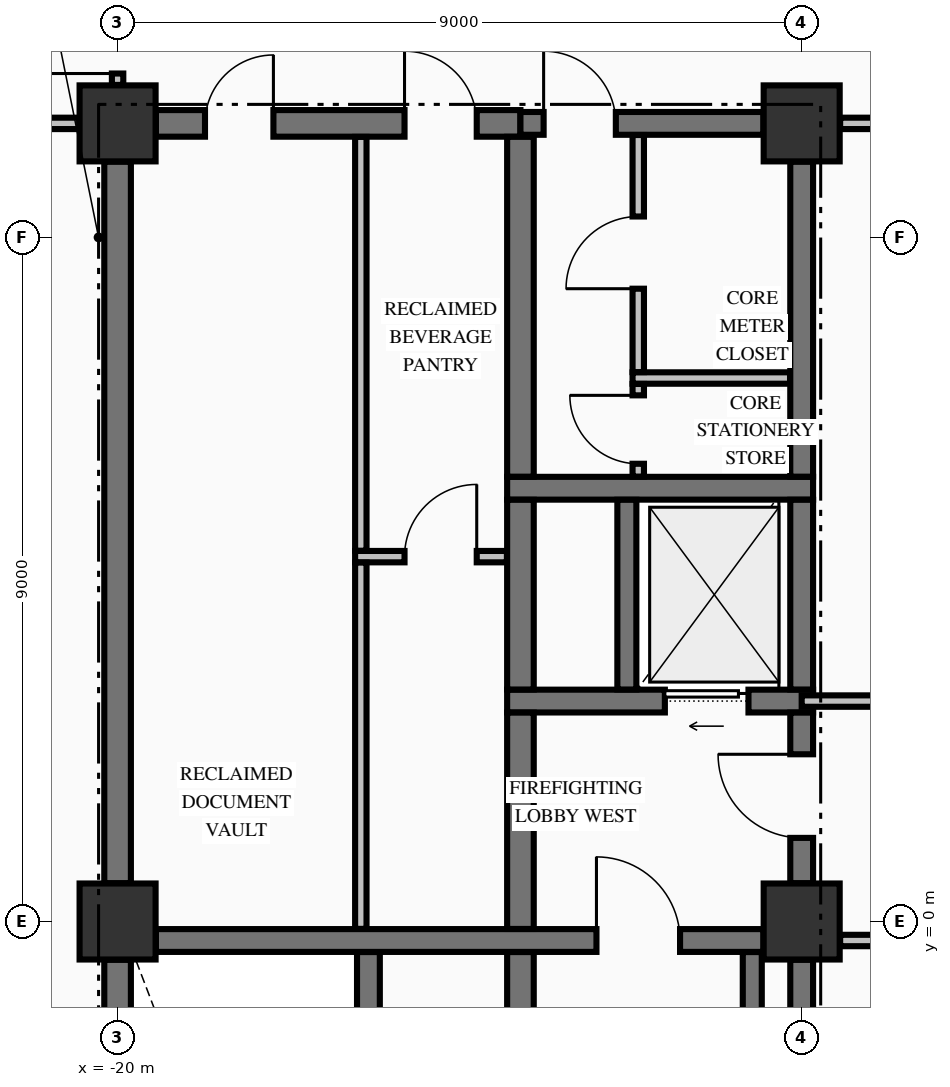
"""IFC4 building model, lengths in metres.
Left out: names, types, materials, properties, quantities, classifications, styles, units other than length and angle.
Written with IfcOpenShell. Run it as: python <this file> out.ifc"""

import sys

from ifc_helpers import new_model, si_unit, direction, frame, frame_2d, origin, origin_2d, place, context, subcontext, project, spatial, rectangle, extrude, element, fill, save


model = new_model("IFC4")
c1 = context("Model", 3, precision=1e-05, world=origin(), true_north=direction((0.0, 1.0)))
c2 = subcontext(c1, "Body", "Model", "MODEL_VIEW")
j1 = project(units=[si_unit("LENGTHUNIT", "METRE"), si_unit("PLANEANGLEUNIT", "RADIAN")], contexts=[c1])
p1 = place(None, origin())
s1 = spatial("IfcSite", under=j1, at=p1, CompositionType="ELEMENT")
p2 = place(p1, origin())
s2 = spatial("IfcBuilding", under=s1, at=p2, CompositionType="ELEMENT")
p3 = place(p2, frame((0.0, 0.0, 146.34)))
s3 = spatial("IfcBuildingStorey", under=s2, at=p3, CompositionType="ELEMENT", Elevation=146.34)
for number, where, z_axis, x_axis in (
    (1, (-20.0, 10.5, -0.25), (0.0, 0.0, 1.0), (1.0, 0.0, 0.0)),
    (2, (-11.0, 0.0, -0.25), (0.0, 0.0, 1.0), (1.0, 0.0, 0.0)),
    (3, (-11.0, 10.5, -0.25), (0.0, 0.0, 1.0), (1.0, 0.0, 0.0)),
    (4, (-20.0, 0.0, -0.25), (0.0, 0.0, 1.0), (1.0, 0.0, 0.0)),
):
    element("IfcColumn", number, at=place(p3, frame(where, z_axis=z_axis, x_axis=x_axis)), inside=s3, PredefinedType="COLUMN", context=c2, shape_type="SweptSolid", body=[
        extrude(rectangle(XDim=1.0, YDim=1.0, at=origin_2d()), origin(), (0.0, 0.0, 1.0), 3.57),
    ])
p4 = place(p3, frame((-19.496, -0.25, 0.0), z_axis=(0.0, 0.0, 1.0), x_axis=(1.0, 0.0, 0.0)))
e5 = element("IfcWall", 5, at=p4, inside=s3, PredefinedType="SHEAR", context=c2, shape_type="SweptSolid", body=[
    extrude(rectangle(XDim=7.992, YDim=0.3, at=frame_2d((3.996, 0.0))), origin(), (0.0, 0.0, 1.0), 3.32),
])
p5 = place(p4, frame((5.796, 0.0, 0.0)))
e6 = element("IfcOpeningElement", 6, at=p5, cuts=e5, PredefinedType="OPENING", context=c2, shape_type="SweptSolid", body=[
    extrude(rectangle(XDim=1.1, YDim=2.15, at=frame_2d((0.55, 1.075))), frame((0.0, 0.16, 0.0), z_axis=(0.0, -1.0, 0.0), x_axis=(1.0, 0.0, 0.0)), (0.0, 0.0, 1.0), 0.32),
])
p6 = place(p3, frame((-14.875, 2.9, 0.0), z_axis=(0.0, 0.0, 1.0), x_axis=(1.0, 0.0, 0.0)))
e7 = element("IfcWall", 7, at=p6, inside=s3, PredefinedType="SHEAR", context=c2, shape_type="SweptSolid", body=[
    extrude(rectangle(XDim=4.025, YDim=0.3, at=frame_2d((2.012, 0.0))), origin(), (0.0, 0.0, 1.0), 3.32),
])
p7 = place(p6, frame((2.075, 0.0, 0.0)))
e8 = element("IfcOpeningElement", 8, at=p7, cuts=e7, PredefinedType="OPENING", context=c2, shape_type="SweptSolid", body=[
    extrude(rectangle(XDim=1.1, YDim=2.2, at=frame_2d((0.55, 1.1))), frame((0.0, 0.16, 0.0), z_axis=(0.0, -1.0, 0.0), x_axis=(1.0, 0.0, 0.0)), (0.0, 0.0, 1.0), 0.32),
])
p8 = place(p3, frame((-14.875, 5.7, 0.0), z_axis=(0.0, 0.0, 1.0), x_axis=(1.0, 0.0, 0.0)))
e9 = element("IfcWall", 9, at=p8, inside=s3, PredefinedType="SHEAR", context=c2, shape_type="SweptSolid", body=[
    extrude(rectangle(XDim=4.025, YDim=0.3, at=frame_2d((2.012, 0.0))), origin(), (0.0, 0.0, 1.0), 3.32),
])
p9 = place(p3, frame((-19.496, 10.5, 0.0), z_axis=(0.0, 0.0, 1.0), x_axis=(1.0, 0.0, 0.0)))
e10 = element("IfcWall", 10, at=p9, inside=s3, PredefinedType="SHEAR", context=c2, shape_type="SweptSolid", body=[
    extrude(rectangle(XDim=4.796, YDim=0.35, at=frame_2d((2.398, 0.0))), origin(), (0.0, 0.0, 1.0), 3.32),
])
p10 = place(p9, frame((0.646, 0.0, 0.0)))
e11 = element("IfcOpeningElement", 11, at=p10, cuts=e10, PredefinedType="OPENING", context=c2, shape_type="SweptSolid", body=[
    extrude(rectangle(XDim=0.9, YDim=2.15, at=frame_2d((0.45, 1.075))), frame((0.0, 0.185, 0.0), z_axis=(0.0, -1.0, 0.0), x_axis=(1.0, 0.0, 0.0)), (0.0, 0.0, 1.0), 0.37),
])
p11 = place(p9, frame((3.271, 0.0, 0.0)))
e12 = element("IfcOpeningElement", 12, at=p11, cuts=e10, PredefinedType="OPENING", context=c2, shape_type="SweptSolid", body=[
    extrude(rectangle(XDim=0.95, YDim=2.15, at=frame_2d((0.475, 1.075))), frame((0.0, 0.185, 0.0), z_axis=(0.0, -1.0, 0.0), x_axis=(1.0, 0.0, 0.0)), (0.0, 0.0, 1.0), 0.37),
])
p12 = place(p3, frame((-14.7, 10.5, 0.0), z_axis=(0.0, 0.0, 1.0), x_axis=(1.0, 0.0, 0.0)))
e13 = element("IfcWall", 13, at=p12, inside=s3, PredefinedType="SHEAR", context=c2, shape_type="SweptSolid", body=[
    extrude(rectangle(XDim=3.196, YDim=0.3, at=frame_2d((1.598, 0.0))), origin(), (0.0, 0.0, 1.0), 3.32),
])
p13 = place(p12, frame((0.305, 0.0, 0.0)))
e14 = element("IfcOpeningElement", 14, at=p13, cuts=e13, PredefinedType="OPENING", context=c2, shape_type="SweptSolid", body=[
    extrude(rectangle(XDim=0.95, YDim=2.15, at=frame_2d((0.475, 1.075))), frame((0.0, 0.16, 0.0), z_axis=(0.0, -1.0, 0.0), x_axis=(1.0, 0.0, 0.0)), (0.0, 0.0, 1.0), 0.32),
])
p14 = place(p3, frame((-10.494, -0.25, 0.0), z_axis=(0.0, 0.0, 1.0), x_axis=(1.0, 0.0, 0.0)))
e15 = element("IfcWall", 15, at=p14, inside=s3, PredefinedType="PARTITIONING", context=c2, shape_type="SweptSolid", body=[
    extrude(rectangle(XDim=20.988, YDim=0.15, at=frame_2d((10.494, 0.0))), origin(), (0.0, 0.0, 1.0), 3.32),
])
p15 = place(p14, frame((12.594, 0.0, 0.0)))
e16 = element("IfcOpeningElement", 16, at=p15, cuts=e15, PredefinedType="OPENING", context=c2, shape_type="SweptSolid", body=[
    extrude(rectangle(XDim=1.1, YDim=2.15, at=frame_2d((0.55, 1.075))), frame((0.0, 0.085, 0.0), z_axis=(0.0, -1.0, 0.0), x_axis=(1.0, 0.0, 0.0)), (0.0, 0.0, 1.0), 0.17),
])
p16 = place(p14, frame((5.249, 0.0, 0.0)))
e17 = element("IfcOpeningElement", 17, at=p16, cuts=e15, PredefinedType="OPENING", context=c2, shape_type="SweptSolid", body=[
    extrude(rectangle(XDim=1.05, YDim=2.15, at=frame_2d((0.525, 1.075))), frame((0.0, 0.085, 0.0), z_axis=(0.0, -1.0, 0.0), x_axis=(1.0, 0.0, 0.0)), (0.0, 0.0, 1.0), 0.17),
])
p17 = place(p14, frame((17.399, 0.0, 0.0)))
e18 = element("IfcOpeningElement", 18, at=p17, cuts=e15, PredefinedType="OPENING", context=c2, shape_type="SweptSolid", body=[
    extrude(rectangle(XDim=0.95, YDim=2.15, at=frame_2d((0.475, 1.075))), frame((0.0, 0.085, 0.0), z_axis=(0.0, -1.0, 0.0), x_axis=(1.0, 0.0, 0.0)), (0.0, 0.0, 1.0), 0.17),
])
p18 = place(p3, frame((-11.0, 2.9, 0.0), z_axis=(0.0, 0.0, 1.0), x_axis=(1.0, 0.0, 0.0)))
e19 = element("IfcWall", 19, at=p18, inside=s3, PredefinedType="PARTITIONING", context=c2, shape_type="SweptSolid", body=[
    extrude(rectangle(XDim=22.0, YDim=0.15, at=frame_2d((11.0, 0.0))), origin(), (0.0, 0.0, 1.0), 3.32),
])
p19 = place(p18, frame((13.1, 0.0, 0.0)))
e20 = element("IfcOpeningElement", 20, at=p19, cuts=e19, PredefinedType="OPENING", context=c2, shape_type="SweptSolid", body=[
    extrude(rectangle(XDim=1.1, YDim=2.15, at=frame_2d((0.55, 1.075))), frame((0.0, 0.085, 0.0), z_axis=(0.0, -1.0, 0.0), x_axis=(1.0, 0.0, 0.0)), (0.0, 0.0, 1.0), 0.17),
])
p20 = place(p18, frame((5.755, 0.0, 0.0)))
e21 = element("IfcOpeningElement", 21, at=p20, cuts=e19, PredefinedType="OPENING", context=c2, shape_type="SweptSolid", body=[
    extrude(rectangle(XDim=1.05, YDim=2.15, at=frame_2d((0.525, 1.075))), frame((0.0, 0.085, 0.0), z_axis=(0.0, -1.0, 0.0), x_axis=(1.0, 0.0, 0.0)), (0.0, 0.0, 1.0), 0.17),
])
p21 = place(p18, frame((15.755, 0.0, 0.0)))
e22 = element("IfcOpeningElement", 22, at=p21, cuts=e19, PredefinedType="OPENING", context=c2, shape_type="SweptSolid", body=[
    extrude(rectangle(XDim=0.95, YDim=2.15, at=frame_2d((0.475, 1.075))), frame((0.0, 0.085, 0.0), z_axis=(0.0, -1.0, 0.0), x_axis=(1.0, 0.0, 0.0)), (0.0, 0.0, 1.0), 0.17),
])
p22 = place(p18, frame((19.385, 0.0, 0.0)))
e23 = element("IfcOpeningElement", 23, at=p22, cuts=e19, PredefinedType="OPENING", context=c2, shape_type="SweptSolid", body=[
    extrude(rectangle(XDim=0.95, YDim=2.15, at=frame_2d((0.475, 1.075))), frame((0.0, 0.085, 0.0), z_axis=(0.0, -1.0, 0.0), x_axis=(1.0, 0.0, 0.0)), (0.0, 0.0, 1.0), 0.17),
])
p23 = place(p3, frame((-16.875, 4.8, 0.0), z_axis=(0.0, 0.0, 1.0), x_axis=(1.0, 0.0, 0.0)))
e24 = element("IfcWall", 24, at=p23, inside=s3, PredefinedType="PARTITIONING", context=c2, shape_type="SweptSolid", body=[
    extrude(rectangle(XDim=1.997, YDim=0.15, at=frame_2d((0.999, 0.0))), origin(), (0.0, 0.0, 1.0), 3.32),
])
p24 = place(p23, frame((0.65, 0.0, 0.0)))
e25 = element("IfcOpeningElement", 25, at=p24, cuts=e24, PredefinedType="OPENING", context=c2, shape_type="SweptSolid", body=[
    extrude(rectangle(XDim=0.95, YDim=2.15, at=frame_2d((0.475, 1.075))), frame((0.0, 0.085, 0.0), z_axis=(0.0, -1.0, 0.0), x_axis=(1.0, 0.0, 0.0)), (0.0, 0.0, 1.0), 0.17),
])
p25 = place(p3, frame((-13.225, 7.15, 0.0), z_axis=(0.0, 0.0, 1.0), x_axis=(1.0, 0.0, 0.0)))
e26 = element("IfcWall", 26, at=p25, inside=s3, PredefinedType="PARTITIONING", context=c2, shape_type="SweptSolid", body=[
    extrude(rectangle(XDim=2.072, YDim=0.15, at=frame_2d((1.036, 0.0))), origin(), (0.0, 0.0, 1.0), 3.32),
])
p26 = place(p3, frame((-27.835, 10.5, 0.0), z_axis=(0.0, 0.0, 1.0), x_axis=(1.0, 0.0, 0.0)))
e27 = element("IfcWall", 27, at=p26, inside=s3, PredefinedType="PARTITIONING", context=c2, shape_type="SweptSolid", body=[
    extrude(rectangle(XDim=7.329, YDim=0.15, at=frame_2d((3.665, 0.0))), origin(), (0.0, 0.0, 1.0), 3.32),
])
p27 = place(p26, frame((3.335, 0.0, 0.0)))
e28 = element("IfcOpeningElement", 28, at=p27, cuts=e27, PredefinedType="OPENING", context=c2, shape_type="SweptSolid", body=[
    extrude(rectangle(XDim=1.0, YDim=2.15, at=frame_2d((0.5, 1.075))), frame((0.0, 0.085, 0.0), z_axis=(0.0, -1.0, 0.0), x_axis=(1.0, 0.0, 0.0)), (0.0, 0.0, 1.0), 0.17),
])
p28 = place(p3, frame((-10.494, 10.5, 0.0), z_axis=(0.0, 0.0, 1.0), x_axis=(1.0, 0.0, 0.0)))
e29 = element("IfcWall", 29, at=p28, inside=s3, PredefinedType="PARTITIONING", context=c2, shape_type="SweptSolid", body=[
    extrude(rectangle(XDim=20.988, YDim=0.15, at=frame_2d((10.494, 0.0))), origin(), (0.0, 0.0, 1.0), 3.32),
])
p29 = place(p28, frame((12.594, 0.0, 0.0)))
e30 = element("IfcOpeningElement", 30, at=p29, cuts=e29, PredefinedType="OPENING", context=c2, shape_type="SweptSolid", body=[
    extrude(rectangle(XDim=1.1, YDim=2.15, at=frame_2d((0.55, 1.075))), frame((0.0, 0.085, 0.0), z_axis=(0.0, -1.0, 0.0), x_axis=(1.0, 0.0, 0.0)), (0.0, 0.0, 1.0), 0.17),
])
p30 = place(p3, frame((-20.0, -9.446, 0.0), z_axis=(0.0, 0.0, 1.0), x_axis=(0.0, 1.0, 0.0)))
e31 = element("IfcWall", 31, at=p30, inside=s3, PredefinedType="SHEAR", context=c2, shape_type="SweptSolid", body=[
    extrude(rectangle(XDim=8.942, YDim=0.35, at=frame_2d((4.471, 0.0))), origin(), (0.0, 0.0, 1.0), 3.32),
])
p31 = place(p3, frame((-20.0, 0.504, 0.0), z_axis=(0.0, 0.0, 1.0), x_axis=(0.0, 1.0, 0.0)))
e32 = element("IfcWall", 32, at=p31, inside=s3, PredefinedType="SHEAR", context=c2, shape_type="SweptSolid", body=[
    extrude(rectangle(XDim=9.492, YDim=0.35, at=frame_2d((4.746, 0.0))), origin(), (0.0, 0.0, 1.0), 3.32),
])
p32 = place(p3, frame((-16.7, -9.773, 0.0), z_axis=(0.0, 0.0, 1.0), x_axis=(0.0, 1.0, 0.0)))
e33 = element("IfcWall", 33, at=p32, inside=s3, PredefinedType="SHEAR", context=c2, shape_type="SweptSolid", body=[
    extrude(rectangle(XDim=9.371, YDim=0.3, at=frame_2d((4.686, 0.0))), origin(), (0.0, 0.0, 1.0), 3.32),
])
p33 = place(p3, frame((-14.7, -9.773, 0.0), z_axis=(0.0, 0.0, 1.0), x_axis=(0.0, 1.0, 0.0)))
e34 = element("IfcWall", 34, at=p33, inside=s3, PredefinedType="SHEAR", context=c2, shape_type="SweptSolid", body=[
    extrude(rectangle(XDim=9.371, YDim=0.35, at=frame_2d((4.686, 0.0))), origin(), (0.0, 0.0, 1.0), 3.32),
])
p34 = place(p3, frame((-14.7, -0.098, 0.0), z_axis=(0.0, 0.0, 1.0), x_axis=(0.0, 1.0, 0.0)))
e35 = element("IfcWall", 35, at=p34, inside=s3, PredefinedType="SHEAR", context=c2, shape_type="SweptSolid", body=[
    extrude(rectangle(XDim=2.846, YDim=0.35, at=frame_2d((1.423, 0.0))), origin(), (0.0, 0.0, 1.0), 3.32),
])
p35 = place(p3, frame((-14.7, 3.052, 0.0), z_axis=(0.0, 0.0, 1.0), x_axis=(0.0, 1.0, 0.0)))
e36 = element("IfcWall", 36, at=p35, inside=s3, PredefinedType="SHEAR", context=c2, shape_type="SweptSolid", body=[
    extrude(rectangle(XDim=2.496, YDim=0.35, at=frame_2d((1.248, 0.0))), origin(), (0.0, 0.0, 1.0), 3.32),
])
p36 = place(p3, frame((-14.7, 5.852, 0.0), z_axis=(0.0, 0.0, 1.0), x_axis=(0.0, 1.0, 0.0)))
e37 = element("IfcWall", 37, at=p36, inside=s3, PredefinedType="SHEAR", context=c2, shape_type="SweptSolid", body=[
    extrude(rectangle(XDim=4.471, YDim=0.35, at=frame_2d((2.235, 0.0))), origin(), (0.0, 0.0, 1.0), 3.32),
])
p37 = place(p3, frame((-13.3, 3.052, 0.0), z_axis=(0.0, 0.0, 1.0), x_axis=(0.0, 1.0, 0.0)))
e38 = element("IfcWall", 38, at=p37, inside=s3, PredefinedType="SOLIDWALL", context=c2, shape_type="SweptSolid", body=[
    extrude(rectangle(XDim=2.496, YDim=0.25, at=frame_2d((1.248, 0.0))), origin(), (0.0, 0.0, 1.0), 3.32),
])
p38 = place(p3, frame((-11.65, -9.798, 0.0), z_axis=(0.0, 0.0, 1.0), x_axis=(0.0, 1.0, 0.0)))
e39 = element("IfcWall", 39, at=p38, inside=s3, PredefinedType="SOLIDWALL", context=c2, shape_type="SweptSolid", body=[
    extrude(rectangle(XDim=9.396, YDim=0.25, at=frame_2d((4.698, 0.0))), origin(), (0.0, 0.0, 1.0), 3.32),
])
p39 = place(p3, frame((-11.0, -9.446, 0.0), z_axis=(0.0, 0.0, 1.0), x_axis=(0.0, 1.0, 0.0)))
e40 = element("IfcWall", 40, at=p39, inside=s3, PredefinedType="SHEAR", context=c2, shape_type="SweptSolid", body=[
    extrude(rectangle(XDim=8.942, YDim=0.3, at=frame_2d((4.471, 0.0))), origin(), (0.0, 0.0, 1.0), 3.32),
])
p40 = place(p3, frame((-11.0, 0.504, 0.0), z_axis=(0.0, 0.0, 1.0), x_axis=(0.0, 1.0, 0.0)))
e41 = element("IfcWall", 41, at=p40, inside=s3, PredefinedType="SHEAR", context=c2, shape_type="SweptSolid", body=[
    extrude(rectangle(XDim=2.244, YDim=0.3, at=frame_2d((1.122, 0.0))), origin(), (0.0, 0.0, 1.0), 3.32),
])
p41 = place(p40, frame((0.596, 0.0, 0.0)))
e42 = element("IfcOpeningElement", 42, at=p41, cuts=e41, PredefinedType="OPENING", context=c2, shape_type="SweptSolid", body=[
    extrude(rectangle(XDim=1.1, YDim=2.15, at=frame_2d((0.55, 1.075))), frame((0.0, 0.16, 0.0), z_axis=(0.0, -1.0, 0.0), x_axis=(1.0, 0.0, 0.0)), (0.0, 0.0, 1.0), 0.32),
])
p42 = place(p3, frame((-11.0, 3.052, 0.0), z_axis=(0.0, 0.0, 1.0), x_axis=(0.0, 1.0, 0.0)))
e43 = element("IfcWall", 43, at=p42, inside=s3, PredefinedType="SHEAR", context=c2, shape_type="SweptSolid", body=[
    extrude(rectangle(XDim=2.496, YDim=0.3, at=frame_2d((1.248, 0.0))), origin(), (0.0, 0.0, 1.0), 3.32),
])
p43 = place(p3, frame((-11.0, 5.852, 0.0), z_axis=(0.0, 0.0, 1.0), x_axis=(0.0, 1.0, 0.0)))
e44 = element("IfcWall", 44, at=p43, inside=s3, PredefinedType="SHEAR", context=c2, shape_type="SweptSolid", body=[
    extrude(rectangle(XDim=4.144, YDim=0.3, at=frame_2d((2.072, 0.0))), origin(), (0.0, 0.0, 1.0), 3.32),
])
p44 = place(p3, frame((-20.0, 11.006, 0.0), z_axis=(0.0, 0.0, 1.0), x_axis=(0.0, 1.0, 0.0)))
e45 = element("IfcWall", 45, at=p44, inside=s3, PredefinedType="PARTITIONING", context=c2, shape_type="SweptSolid", body=[
    extrude(rectangle(XDim=1.666, YDim=0.15, at=frame_2d((0.833, 0.0))), origin(), (0.0, 0.0, 1.0), 2.81),
])
p45 = place(p44, frame((0.15, 0.0, 0.0)))
e46 = element("IfcOpeningElement", 46, at=p45, cuts=e45, PredefinedType="OPENING", context=c2, shape_type="SweptSolid", body=[
    extrude(rectangle(XDim=0.95, YDim=2.15, at=frame_2d((0.475, 1.075))), frame((0.0, 0.085, 0.0), z_axis=(0.0, -1.0, 0.0), x_axis=(1.0, 0.0, 0.0)), (0.0, 0.0, 1.0), 0.17),
])
p46 = place(p3, frame((-16.8, -0.097, 0.0), z_axis=(0.0, 0.0, 1.0), x_axis=(0.0, 1.0, 0.0)))
e47 = element("IfcWall", 47, at=p46, inside=s3, PredefinedType="PARTITIONING", context=c2, shape_type="SweptSolid", body=[
    extrude(rectangle(XDim=4.819, YDim=0.15, at=frame_2d((2.409, 0.0))), origin(), (0.0, 0.0, 1.0), 3.32),
])
p47 = place(p3, frame((-16.8, 4.878, 0.0), z_axis=(0.0, 0.0, 1.0), x_axis=(0.0, 1.0, 0.0)))
e48 = element("IfcWall", 48, at=p47, inside=s3, PredefinedType="PARTITIONING", context=c2, shape_type="SweptSolid", body=[
    extrude(rectangle(XDim=5.444, YDim=0.15, at=frame_2d((2.722, 0.0))), origin(), (0.0, 0.0, 1.0), 3.32),
])
p48 = place(p3, frame((-13.15, 5.853, 0.0), z_axis=(0.0, 0.0, 1.0), x_axis=(0.0, 1.0, 0.0)))
e49 = element("IfcWall", 49, at=p48, inside=s3, PredefinedType="PARTITIONING", context=c2, shape_type="SweptSolid", body=[
    extrude(rectangle(XDim=1.219, YDim=0.15, at=frame_2d((0.609, 0.0))), origin(), (0.0, 0.0, 1.0), 3.32),
])
p49 = place(p48, frame((0.169, 0.0, 0.0)))
e50 = element("IfcOpeningElement", 50, at=p49, cuts=e49, PredefinedType="OPENING", context=c2, shape_type="SweptSolid", body=[
    extrude(rectangle(XDim=0.9, YDim=2.15, at=frame_2d((0.45, 1.075))), frame((0.0, 0.085, 0.0), z_axis=(0.0, -1.0, 0.0), x_axis=(1.0, 0.0, 0.0)), (0.0, 0.0, 1.0), 0.17),
])
p50 = place(p3, frame((-13.15, 7.228, 0.0), z_axis=(0.0, 0.0, 1.0), x_axis=(0.0, 1.0, 0.0)))
e51 = element("IfcWall", 51, at=p50, inside=s3, PredefinedType="PARTITIONING", context=c2, shape_type="SweptSolid", body=[
    extrude(rectangle(XDim=3.119, YDim=0.15, at=frame_2d((1.56, 0.0))), origin(), (0.0, 0.0, 1.0), 3.32),
])
p51 = place(p50, frame((1.097, 0.0, 0.0)))
e52 = element("IfcOpeningElement", 52, at=p51, cuts=e51, PredefinedType="OPENING", context=c2, shape_type="SweptSolid", body=[
    extrude(rectangle(XDim=0.95, YDim=2.15, at=frame_2d((0.475, 1.075))), frame((0.0, 0.085, 0.0), z_axis=(0.0, -1.0, 0.0), x_axis=(1.0, 0.0, 0.0)), (0.0, 0.0, 1.0), 0.17),
])
p52 = place(p5, origin())
e53 = element("IfcDoor", 53, at=p52, inside=s3, OperationType="SINGLE_SWING_LEFT", PredefinedType="DOOR", context=c2, shape_type="SweptSolid", body=[
    extrude(rectangle(XDim=1.1, YDim=2.15, at=frame_2d((0.55, 1.075))), frame((0.0, 0.025, 0.0), z_axis=(0.0, -1.0, 0.0), x_axis=(1.0, 0.0, 0.0)), (0.0, 0.0, 1.0), 0.05),
])
fill(e6, e53)
p53 = place(p41, origin())
e54 = element("IfcDoor", 54, at=p53, inside=s3, OperationType="SINGLE_SWING_RIGHT", PredefinedType="DOOR", context=c2, shape_type="SweptSolid", body=[
    extrude(rectangle(XDim=1.1, YDim=2.15, at=frame_2d((0.55, 1.075))), frame((0.0, 0.025, 0.0), z_axis=(0.0, -1.0, 0.0), x_axis=(1.0, 0.0, 0.0)), (0.0, 0.0, 1.0), 0.05),
])
fill(e42, e54)
p54 = place(p7, origin())
e55 = element("IfcDoor", 55, at=p54, inside=s3, OperationType="SLIDING_TO_LEFT", PredefinedType="DOOR", context=c2, shape_type="SweptSolid", body=[
    extrude(rectangle(XDim=1.1, YDim=2.2, at=frame_2d((0.55, 1.1))), frame((0.0, 0.025, 0.0), z_axis=(0.0, -1.0, 0.0), x_axis=(1.0, 0.0, 0.0)), (0.0, 0.0, 1.0), 0.05),
])
fill(e8, e55)
p55 = place(p13, origin())
e56 = element("IfcDoor", 56, at=p55, inside=s3, OperationType="SINGLE_SWING_LEFT", PredefinedType="DOOR", context=c2, shape_type="SweptSolid", body=[
    extrude(rectangle(XDim=0.95, YDim=2.15, at=frame_2d((0.475, 1.075))), frame((0.0, 0.025, 0.0), z_axis=(0.0, -1.0, 0.0), x_axis=(1.0, 0.0, 0.0)), (0.0, 0.0, 1.0), 0.05),
])
fill(e14, e56)
p56 = place(p49, origin())
e57 = element("IfcDoor", 57, at=p56, inside=s3, OperationType="SINGLE_SWING_RIGHT", PredefinedType="DOOR", context=c2, shape_type="SweptSolid", body=[
    extrude(rectangle(XDim=0.9, YDim=2.15, at=frame_2d((0.45, 1.075))), frame((0.0, 0.025, 0.0), z_axis=(0.0, -1.0, 0.0), x_axis=(1.0, 0.0, 0.0)), (0.0, 0.0, 1.0), 0.05),
])
fill(e50, e57)
p57 = place(p51, origin())
e58 = element("IfcDoor", 58, at=p57, inside=s3, OperationType="SINGLE_SWING_LEFT", PredefinedType="DOOR", context=c2, shape_type="SweptSolid", body=[
    extrude(rectangle(XDim=0.95, YDim=2.15, at=frame_2d((0.475, 1.075))), frame((0.0, 0.025, 0.0), z_axis=(0.0, -1.0, 0.0), x_axis=(1.0, 0.0, 0.0)), (0.0, 0.0, 1.0), 0.05),
])
fill(e52, e58)
p58 = place(p10, origin())
e59 = element("IfcDoor", 59, at=p58, inside=s3, OperationType="SINGLE_SWING_RIGHT", PredefinedType="DOOR", context=c2, shape_type="SweptSolid", body=[
    extrude(rectangle(XDim=0.9, YDim=2.15, at=frame_2d((0.45, 1.075))), frame((0.0, 0.025, 0.0), z_axis=(0.0, -1.0, 0.0), x_axis=(1.0, 0.0, 0.0)), (0.0, 0.0, 1.0), 0.05),
])
fill(e11, e59)
p59 = place(p11, origin())
e60 = element("IfcDoor", 60, at=p59, inside=s3, OperationType="SINGLE_SWING_LEFT", PredefinedType="DOOR", context=c2, shape_type="SweptSolid", body=[
    extrude(rectangle(XDim=0.95, YDim=2.15, at=frame_2d((0.475, 1.075))), frame((0.0, 0.025, 0.0), z_axis=(0.0, -1.0, 0.0), x_axis=(1.0, 0.0, 0.0)), (0.0, 0.0, 1.0), 0.05),
])
fill(e12, e60)
p60 = place(p24, origin())
e61 = element("IfcDoor", 61, at=p60, inside=s3, OperationType="SINGLE_SWING_RIGHT", PredefinedType="DOOR", context=c2, shape_type="SweptSolid", body=[
    extrude(rectangle(XDim=0.95, YDim=2.15, at=frame_2d((0.475, 1.075))), frame((0.0, 0.025, 0.0), z_axis=(0.0, -1.0, 0.0), x_axis=(1.0, 0.0, 0.0)), (0.0, 0.0, 1.0), 0.05),
])
fill(e25, e61)
p61 = place(p45, origin())
e62 = element("IfcDoor", 62, at=p61, inside=s3, OperationType="SINGLE_SWING_LEFT", PredefinedType="DOOR", context=c2, shape_type="SweptSolid", body=[
    extrude(rectangle(XDim=0.95, YDim=2.15, at=frame_2d((0.475, 1.075))), frame((0.0, 0.025, 0.0), z_axis=(0.0, -1.0, 0.0), x_axis=(1.0, 0.0, 0.0)), (0.0, 0.0, 1.0), 0.05),
])
fill(e46, e62)
save(model, sys.argv[1])
